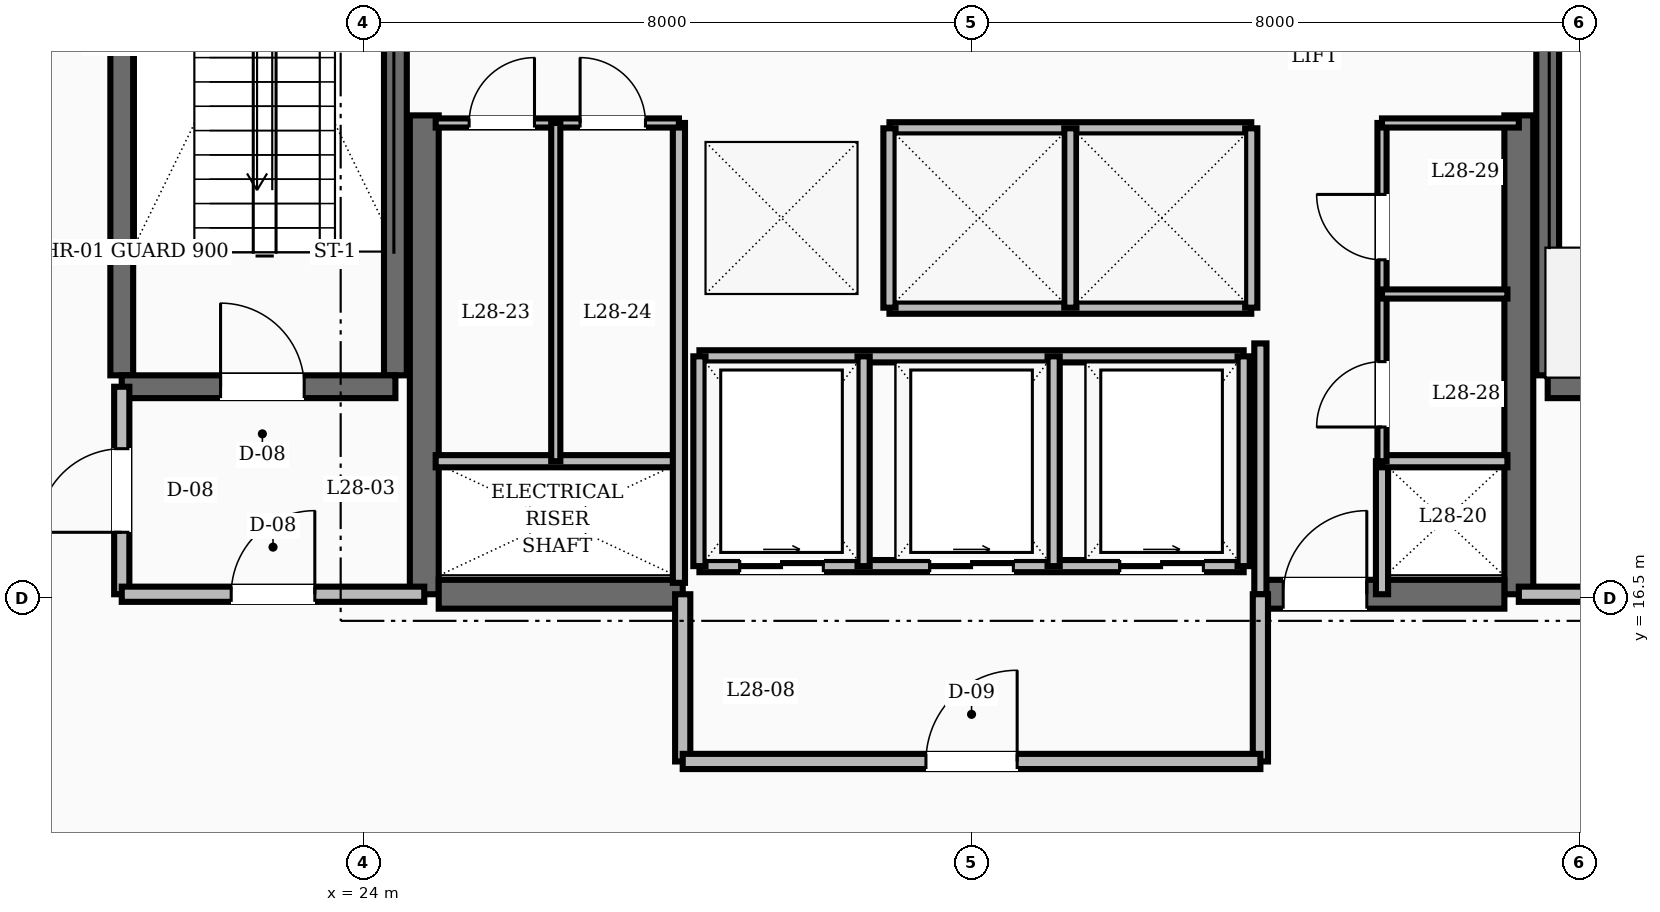
"""IFC4 building model, lengths in metres.
Left out: names, types, materials, properties, quantities, classifications, styles, units other than length and angle.
Written with IfcOpenShell. Run it as: python <this file> out.ifc"""

import sys

from ifc_helpers import new_model, si_unit, direction, frame, frame_2d, origin, place, context, subcontext, project, spatial, rectangle, extrude, element, fill, save


model = new_model("IFC4")
c1 = context("Model", 3, precision=1e-05, world=origin(), true_north=direction((0.0, 1.0)))
c2 = subcontext(c1, "Body", "Model", "MODEL_VIEW")
j1 = project(units=[si_unit("LENGTHUNIT", "METRE"), si_unit("PLANEANGLEUNIT", "RADIAN")], contexts=[c1])
p1 = place(None, origin())
s1 = spatial("IfcSite", under=j1, at=p1, CompositionType="ELEMENT")
p2 = place(p1, origin())
s2 = spatial("IfcBuilding", under=s1, at=p2, CompositionType="ELEMENT")
p3 = place(p2, frame((0.0, 0.0, 110.8)))
s3 = spatial("IfcBuildingStorey", under=s2, at=p3, CompositionType="ELEMENT", Elevation=110.8)
for number, where, z_axis, x_axis in (
    (1, (24.8, 16.55, 0.0), (0.0, 0.0, 1.0), (0.0, 1.0, 0.0)),
    (2, (39.2, 16.55, 0.0), (0.0, 0.0, 1.0), (0.0, 1.0, 0.0)),
):
    element("IfcWall", number, at=place(p3, frame(where, z_axis=z_axis, x_axis=x_axis)), inside=s3, PredefinedType="SHEAR", context=c2, shape_type="SweptSolid", body=[
        extrude(rectangle(XDim=6.3, YDim=0.38, at=frame_2d((3.15, 0.0))), origin(), (0.0, 0.0, 1.0), 6.4),
    ])
p4 = place(p3, frame((24.99, 16.55, 0.0), z_axis=(0.0, 0.0, 1.0), x_axis=(1.0, 0.0, 0.0)))
e3 = element("IfcWall", 3, at=p4, inside=s3, PredefinedType="SHEAR", context=c2, shape_type="SweptSolid", body=[
    extrude(rectangle(XDim=3.21, YDim=0.38, at=frame_2d((1.605, 0.0))), origin(), (0.0, 0.0, 1.0), 6.4),
])
p5 = place(p3, frame((35.8, 16.55, 0.0), z_axis=(0.0, 0.0, 1.0), x_axis=(1.0, 0.0, 0.0)))
e4 = element("IfcWall", 4, at=p5, inside=s3, PredefinedType="SHEAR", context=c2, shape_type="SweptSolid", body=[
    extrude(rectangle(XDim=3.21, YDim=0.38, at=frame_2d((1.605, 0.0))), origin(), (0.0, 0.0, 1.0), 6.4),
])
p6 = place(p5, frame((0.3, 0.0, 0.0)))
e5 = element("IfcOpeningElement", 5, at=p6, cuts=e4, PredefinedType="OPENING", context=c2, shape_type="SweptSolid", body=[
    extrude(rectangle(XDim=1.1, YDim=2.1, at=frame_2d((0.55, 1.05))), frame((0.0, 0.2, 0.0), z_axis=(0.0, -1.0, 0.0), x_axis=(1.0, 0.0, 0.0)), (0.0, 0.0, 1.0), 0.4),
])
for number, where, z_axis, x_axis in (
    (6, (20.82, 19.43, 0.0), (0.0, 0.0, 1.0), (0.0, 1.0, 0.0)),
    (7, (24.42, 19.43, 0.0), (0.0, 0.0, 1.0), (0.0, 1.0, 0.0)),
):
    element("IfcWall", number, at=place(p3, frame(where, z_axis=z_axis, x_axis=x_axis)), inside=s3, PredefinedType="SHEAR", context=c2, shape_type="SweptSolid", body=[
        extrude(rectangle(XDim=8.74, YDim=0.3, at=frame_2d((4.37, 0.0))), origin(), (0.0, 0.0, 1.0), 6.4),
    ])
p7 = place(p3, frame((20.82, 19.28, 0.0), z_axis=(0.0, 0.0, 1.0), x_axis=(1.0, 0.0, 0.0)))
e8 = element("IfcWall", 8, at=p7, inside=s3, PredefinedType="SHEAR", context=c2, shape_type="SweptSolid", body=[
    extrude(rectangle(XDim=3.6, YDim=0.3, at=frame_2d((1.8, 0.0))), origin(), (0.0, 0.0, 1.0), 6.4),
])
p8 = place(p7, frame((1.3, 0.0, 0.0)))
e9 = element("IfcOpeningElement", 9, at=p8, cuts=e8, PredefinedType="OPENING", context=c2, shape_type="SweptSolid", body=[
    extrude(rectangle(XDim=1.1, YDim=2.1, at=frame_2d((0.55, 1.05))), frame((0.0, 0.16, 0.0), z_axis=(0.0, -1.0, 0.0), x_axis=(1.0, 0.0, 0.0)), (0.0, 0.0, 1.0), 0.32),
])
p9 = place(p3, frame((39.58, 19.43, 0.0), z_axis=(0.0, 0.0, 1.0), x_axis=(0.0, 1.0, 0.0)))
e10 = element("IfcWall", 10, at=p9, inside=s3, PredefinedType="SHEAR", context=c2, shape_type="SweptSolid", body=[
    extrude(rectangle(XDim=8.74, YDim=0.3, at=frame_2d((4.37, 0.0))), origin(), (0.0, 0.0, 1.0), 6.4),
])
p10 = place(p3, frame((39.58, 19.28, 0.0), z_axis=(0.0, 0.0, 1.0), x_axis=(1.0, 0.0, 0.0)))
e11 = element("IfcWall", 11, at=p10, inside=s3, PredefinedType="SHEAR", context=c2, shape_type="SweptSolid", body=[
    extrude(rectangle(XDim=3.6, YDim=0.3, at=frame_2d((1.8, 0.0))), origin(), (0.0, 0.0, 1.0), 6.4),
])
p11 = place(p3, frame((20.82, 16.55, 0.0), z_axis=(0.0, 0.0, 1.0), x_axis=(0.0, 1.0, 0.0)))
e12 = element("IfcWall", 12, at=p11, inside=s3, PredefinedType="SOLIDWALL", context=c2, shape_type="SweptSolid", body=[
    extrude(rectangle(XDim=2.73, YDim=0.2, at=frame_2d((1.365, 0.0))), origin(), (0.0, 0.0, 1.0), 5.12),
])
p12 = place(p11, frame((0.815, 0.0, 0.0)))
e13 = element("IfcOpeningElement", 13, at=p12, cuts=e12, PredefinedType="OPENING", context=c2, shape_type="SweptSolid", body=[
    extrude(rectangle(XDim=1.1, YDim=2.1, at=frame_2d((0.55, 1.05))), frame((0.0, 0.11, 0.0), z_axis=(0.0, -1.0, 0.0), x_axis=(1.0, 0.0, 0.0)), (0.0, 0.0, 1.0), 0.22),
])
p13 = place(p3, frame((20.82, 16.55, 0.0), z_axis=(0.0, 0.0, 1.0), x_axis=(1.0, 0.0, 0.0)))
e14 = element("IfcWall", 14, at=p13, inside=s3, PredefinedType="SOLIDWALL", context=c2, shape_type="SweptSolid", body=[
    extrude(rectangle(XDim=3.98, YDim=0.2, at=frame_2d((1.99, 0.0))), origin(), (0.0, 0.0, 1.0), 5.12),
])
p14 = place(p13, frame((1.44, 0.0, 0.0)))
e15 = element("IfcOpeningElement", 15, at=p14, cuts=e14, PredefinedType="OPENING", context=c2, shape_type="SweptSolid", body=[
    extrude(rectangle(XDim=1.1, YDim=2.1, at=frame_2d((0.55, 1.05))), frame((0.0, 0.11, 0.0), z_axis=(0.0, -1.0, 0.0), x_axis=(1.0, 0.0, 0.0)), (0.0, 0.0, 1.0), 0.22),
])
p15 = place(p3, frame((39.2, 16.55, 0.0), z_axis=(0.0, 0.0, 1.0), x_axis=(1.0, 0.0, 0.0)))
e16 = element("IfcWall", 16, at=p15, inside=s3, PredefinedType="SOLIDWALL", context=c2, shape_type="SweptSolid", body=[
    extrude(rectangle(XDim=3.98, YDim=0.2, at=frame_2d((1.99, 0.0))), origin(), (0.0, 0.0, 1.0), 5.12),
])
p16 = place(p15, frame((1.515, 0.0, 0.0)))
e17 = element("IfcOpeningElement", 17, at=p16, cuts=e16, PredefinedType="OPENING", context=c2, shape_type="SweptSolid", body=[
    extrude(rectangle(XDim=0.95, YDim=2.1, at=frame_2d((0.475, 1.05))), frame((0.0, 0.11, 0.0), z_axis=(0.0, -1.0, 0.0), x_axis=(1.0, 0.0, 0.0)), (0.0, 0.0, 1.0), 0.22),
])
p17 = place(p3, frame((35.8, 16.55, 0.0), z_axis=(0.0, 0.0, 1.0), x_axis=(0.0, 1.0, 0.0)))
e18 = element("IfcWall", 18, at=p17, inside=s3, PredefinedType="SOLIDWALL", context=c2, shape_type="SweptSolid", body=[
    extrude(rectangle(XDim=3.3, YDim=0.16, at=frame_2d((1.65, 0.0))), origin(), (0.0, 0.0, 1.0), 5.12),
])
p18 = place(p3, frame((37.4, 16.55, 0.0), z_axis=(0.0, 0.0, 1.0), x_axis=(0.0, 1.0, 0.0)))
e19 = element("IfcWall", 19, at=p18, inside=s3, PredefinedType="SOLIDWALL", context=c2, shape_type="SweptSolid", body=[
    extrude(rectangle(XDim=1.75, YDim=0.16, at=frame_2d((0.875, 0.0))), origin(), (0.0, 0.0, 1.0), 5.12),
])
for number, where, z_axis, x_axis in (
    (20, (28.2, 14.35, 0.0), (0.0, 0.0, 1.0), (0.0, 1.0, 0.0)),
    (21, (35.8, 14.35, 0.0), (0.0, 0.0, 1.0), (0.0, 1.0, 0.0)),
):
    element("IfcWall", number, at=place(p3, frame(where, z_axis=z_axis, x_axis=x_axis)), inside=s3, PredefinedType="SOLIDWALL", context=c2, shape_type="SweptSolid", body=[
        extrude(rectangle(XDim=2.2, YDim=0.2, at=frame_2d((1.1, 0.0))), origin(), (0.0, 0.0, 1.0), 5.12),
    ])
p19 = place(p3, frame((28.2, 14.35, 0.0), z_axis=(0.0, 0.0, 1.0), x_axis=(1.0, 0.0, 0.0)))
e22 = element("IfcWall", 22, at=p19, inside=s3, PredefinedType="SOLIDWALL", context=c2, shape_type="SweptSolid", body=[
    extrude(rectangle(XDim=7.6, YDim=0.2, at=frame_2d((3.8, 0.0))), origin(), (0.0, 0.0, 1.0), 5.12),
])
p20 = place(p19, frame((3.2, 0.0, 0.0)))
e23 = element("IfcOpeningElement", 23, at=p20, cuts=e22, PredefinedType="OPENING", context=c2, shape_type="SweptSolid", body=[
    extrude(rectangle(XDim=1.2, YDim=2.1, at=frame_2d((0.6, 1.05))), frame((0.0, 0.11, 0.0), z_axis=(0.0, -1.0, 0.0), x_axis=(1.0, 0.0, 0.0)), (0.0, 0.0, 1.0), 0.22),
])
for number, where, z_axis, x_axis in (
    (24, (30.92, 22.68, 0.0), (0.0, 0.0, 1.0), (1.0, 0.0, 0.0)),
    (25, (30.92, 20.32, 0.0), (0.0, 0.0, 1.0), (1.0, 0.0, 0.0)),
):
    element("IfcWall", number, at=place(p3, frame(where, z_axis=z_axis, x_axis=x_axis)), inside=s3, PredefinedType="SOLIDWALL", context=c2, shape_type="SweptSolid", body=[
        extrude(rectangle(XDim=4.76, YDim=0.16, at=frame_2d((2.38, 0.0))), origin(), (0.0, 0.0, 1.0), 5.12),
    ])
for number, where, z_axis, x_axis in (
    (26, (30.92, 20.32, 0.0), (0.0, 0.0, 1.0), (0.0, 1.0, 0.0)),
    (27, (33.3, 20.32, 0.0), (0.0, 0.0, 1.0), (0.0, 1.0, 0.0)),
    (28, (35.68, 20.32, 0.0), (0.0, 0.0, 1.0), (0.0, 1.0, 0.0)),
):
    element("IfcWall", number, at=place(p3, frame(where, z_axis=z_axis, x_axis=x_axis)), inside=s3, PredefinedType="SOLIDWALL", context=c2, shape_type="SweptSolid", body=[
        extrude(rectangle(XDim=2.36, YDim=0.16, at=frame_2d((1.18, 0.0))), origin(), (0.0, 0.0, 1.0), 5.12),
    ])
p21 = place(p3, frame((28.42, 16.92, 0.0), z_axis=(0.0, 0.0, 1.0), x_axis=(1.0, 0.0, 0.0)))
e29 = element("IfcWall", 29, at=p21, inside=s3, PredefinedType="SOLIDWALL", context=c2, shape_type="SweptSolid", body=[
    extrude(rectangle(XDim=7.16, YDim=0.16, at=frame_2d((3.58, 0.0))), origin(), (0.0, 0.0, 1.0), 5.12),
])
p22 = place(p21, frame((0.53, 0.0, 0.0)))
e30 = element("IfcOpeningElement", 30, at=p22, cuts=e29, PredefinedType="OPENING", context=c2, shape_type="SweptSolid", body=[
    extrude(rectangle(XDim=1.1, YDim=2.15, at=frame_2d((0.55, 1.075))), frame((0.0, 0.09, 0.0), z_axis=(0.0, -1.0, 0.0), x_axis=(1.0, 0.0, 0.0)), (0.0, 0.0, 1.0), 0.18),
])
p23 = place(p21, frame((3.03, 0.0, 0.0)))
e31 = element("IfcOpeningElement", 31, at=p23, cuts=e29, PredefinedType="OPENING", context=c2, shape_type="SweptSolid", body=[
    extrude(rectangle(XDim=1.1, YDim=2.15, at=frame_2d((0.55, 1.075))), frame((0.0, 0.09, 0.0), z_axis=(0.0, -1.0, 0.0), x_axis=(1.0, 0.0, 0.0)), (0.0, 0.0, 1.0), 0.18),
])
p24 = place(p21, frame((5.53, 0.0, 0.0)))
e32 = element("IfcOpeningElement", 32, at=p24, cuts=e29, PredefinedType="OPENING", context=c2, shape_type="SweptSolid", body=[
    extrude(rectangle(XDim=1.1, YDim=2.15, at=frame_2d((0.55, 1.075))), frame((0.0, 0.09, 0.0), z_axis=(0.0, -1.0, 0.0), x_axis=(1.0, 0.0, 0.0)), (0.0, 0.0, 1.0), 0.18),
])
p25 = place(p3, frame((28.42, 19.68, 0.0), z_axis=(0.0, 0.0, 1.0), x_axis=(1.0, 0.0, 0.0)))
e33 = element("IfcWall", 33, at=p25, inside=s3, PredefinedType="SOLIDWALL", context=c2, shape_type="SweptSolid", body=[
    extrude(rectangle(XDim=7.16, YDim=0.16, at=frame_2d((3.58, 0.0))), origin(), (0.0, 0.0, 1.0), 5.12),
])
for number, where, z_axis, x_axis in (
    (34, (28.42, 16.92, 0.0), (0.0, 0.0, 1.0), (0.0, 1.0, 0.0)),
    (35, (30.58, 16.92, 0.0), (0.0, 0.0, 1.0), (0.0, 1.0, 0.0)),
    (36, (33.08, 16.92, 0.0), (0.0, 0.0, 1.0), (0.0, 1.0, 0.0)),
    (37, (35.58, 16.92, 0.0), (0.0, 0.0, 1.0), (0.0, 1.0, 0.0)),
):
    element("IfcWall", number, at=place(p3, frame(where, z_axis=z_axis, x_axis=x_axis)), inside=s3, PredefinedType="SOLIDWALL", context=c2, shape_type="SweptSolid", body=[
        extrude(rectangle(XDim=2.76, YDim=0.16, at=frame_2d((1.38, 0.0))), origin(), (0.0, 0.0, 1.0), 5.12),
    ])
p26 = place(p3, frame((24.95, 18.3, 0.0), z_axis=(0.0, 0.0, 1.0), x_axis=(1.0, 0.0, 0.0)))
e38 = element("IfcWall", 38, at=p26, inside=s3, PredefinedType="SOLIDWALL", context=c2, shape_type="SweptSolid", body=[
    extrude(rectangle(XDim=3.2, YDim=0.16, at=frame_2d((1.6, 0.0))), origin(), (0.0, 0.0, 1.0), 5.12),
])
p27 = place(p3, frame((28.15, 16.7, 0.0), z_axis=(0.0, 0.0, 1.0), x_axis=(0.0, 1.0, 0.0)))
e39 = element("IfcWall", 39, at=p27, inside=s3, PredefinedType="SOLIDWALL", context=c2, shape_type="SweptSolid", body=[
    extrude(rectangle(XDim=6.05, YDim=0.16, at=frame_2d((3.025, 0.0))), origin(), (0.0, 0.0, 1.0), 5.12),
])
p28 = place(p3, frame((37.4, 18.3, 0.0), z_axis=(0.0, 0.0, 1.0), x_axis=(1.0, 0.0, 0.0)))
e40 = element("IfcWall", 40, at=p28, inside=s3, PredefinedType="SOLIDWALL", context=c2, shape_type="SweptSolid", body=[
    extrude(rectangle(XDim=1.65, YDim=0.16, at=frame_2d((0.825, 0.0))), origin(), (0.0, 0.0, 1.0), 5.12),
])
p29 = place(p3, frame((24.95, 22.75, 0.0), z_axis=(0.0, 0.0, 1.0), x_axis=(1.0, 0.0, 0.0)))
e41 = element("IfcWall", 41, at=p29, inside=s3, PredefinedType="PARTITIONING", context=c2, shape_type="SweptSolid", body=[
    extrude(rectangle(XDim=3.2, YDim=0.12, at=frame_2d((1.6, 0.0))), origin(), (0.0, 0.0, 1.0), 5.12),
])
p30 = place(p29, frame((0.44, 0.0, 0.0)))
e42 = element("IfcOpeningElement", 42, at=p30, cuts=e41, PredefinedType="OPENING", context=c2, shape_type="SweptSolid", body=[
    extrude(rectangle(XDim=0.86, YDim=2.1, at=frame_2d((0.43, 1.05))), frame((0.0, 0.07, 0.0), z_axis=(0.0, -1.0, 0.0), x_axis=(1.0, 0.0, 0.0)), (0.0, 0.0, 1.0), 0.14),
])
p31 = place(p29, frame((1.9, 0.0, 0.0)))
e43 = element("IfcOpeningElement", 43, at=p31, cuts=e41, PredefinedType="OPENING", context=c2, shape_type="SweptSolid", body=[
    extrude(rectangle(XDim=0.86, YDim=2.1, at=frame_2d((0.43, 1.05))), frame((0.0, 0.07, 0.0), z_axis=(0.0, -1.0, 0.0), x_axis=(1.0, 0.0, 0.0)), (0.0, 0.0, 1.0), 0.14),
])
p32 = place(p3, frame((37.4, 18.3, 0.0), z_axis=(0.0, 0.0, 1.0), x_axis=(0.0, 1.0, 0.0)))
e44 = element("IfcWall", 44, at=p32, inside=s3, PredefinedType="PARTITIONING", context=c2, shape_type="SweptSolid", body=[
    extrude(rectangle(XDim=4.45, YDim=0.12, at=frame_2d((2.225, 0.0))), origin(), (0.0, 0.0, 1.0), 5.12),
])
p33 = place(p32, frame((0.45, 0.0, 0.0)))
e45 = element("IfcOpeningElement", 45, at=p33, cuts=e44, PredefinedType="OPENING", context=c2, shape_type="SweptSolid", body=[
    extrude(rectangle(XDim=0.86, YDim=2.1, at=frame_2d((0.43, 1.05))), frame((0.0, 0.07, 0.0), z_axis=(0.0, -1.0, 0.0), x_axis=(1.0, 0.0, 0.0)), (0.0, 0.0, 1.0), 0.14),
])
p34 = place(p32, frame((2.65, 0.0, 0.0)))
e46 = element("IfcOpeningElement", 46, at=p34, cuts=e44, PredefinedType="OPENING", context=c2, shape_type="SweptSolid", body=[
    extrude(rectangle(XDim=0.86, YDim=2.1, at=frame_2d((0.43, 1.05))), frame((0.0, 0.07, 0.0), z_axis=(0.0, -1.0, 0.0), x_axis=(1.0, 0.0, 0.0)), (0.0, 0.0, 1.0), 0.14),
])
p35 = place(p3, frame((37.4, 22.75, 0.0), z_axis=(0.0, 0.0, 1.0), x_axis=(1.0, 0.0, 0.0)))
e47 = element("IfcWall", 47, at=p35, inside=s3, PredefinedType="PARTITIONING", context=c2, shape_type="SweptSolid", body=[
    extrude(rectangle(XDim=1.8, YDim=0.12, at=frame_2d((0.9, 0.0))), origin(), (0.0, 0.0, 1.0), 5.12),
])
p36 = place(p3, frame((26.53, 18.3, 0.0), z_axis=(0.0, 0.0, 1.0), x_axis=(0.0, 1.0, 0.0)))
e48 = element("IfcWall", 48, at=p36, inside=s3, PredefinedType="PARTITIONING", context=c2, shape_type="SweptSolid", body=[
    extrude(rectangle(XDim=4.45, YDim=0.12, at=frame_2d((2.225, 0.0))), origin(), (0.0, 0.0, 1.0), 5.12),
])
p37 = place(p3, frame((37.4, 20.5, 0.0), z_axis=(0.0, 0.0, 1.0), x_axis=(1.0, 0.0, 0.0)))
e49 = element("IfcWall", 49, at=p37, inside=s3, PredefinedType="PARTITIONING", context=c2, shape_type="SweptSolid", body=[
    extrude(rectangle(XDim=1.65, YDim=0.12, at=frame_2d((0.825, 0.0))), origin(), (0.0, 0.0, 1.0), 5.12),
])
p38 = place(p3, frame((17.65, 14.412, 0.0), z_axis=(0.0, 0.0, 1.0), x_axis=(0.841548863049, -0.540180998464, 0.0)))
e50 = element("IfcWall", 50, at=p38, inside=s3, PredefinedType="SOLIDWALL", context=c2, shape_type="SweptSolid", body=[
    extrude(rectangle(XDim=3.446, YDim=0.2, at=frame_2d((1.723, 0.0))), origin(), (0.0, 0.0, 1.0), 5.12),
])
p39 = place(p8, origin())
e51 = element("IfcDoor", 51, at=p39, inside=s3, OperationType="SINGLE_SWING_LEFT", PredefinedType="DOOR", context=c2, shape_type="SweptSolid", body=[
    extrude(rectangle(XDim=1.1, YDim=2.1, at=frame_2d((0.55, 1.05))), frame((0.0, 0.025, 0.0), z_axis=(0.0, -1.0, 0.0), x_axis=(1.0, 0.0, 0.0)), (0.0, 0.0, 1.0), 0.05),
])
fill(e9, e51)
p40 = place(p12, origin())
e52 = element("IfcDoor", 52, at=p40, inside=s3, OperationType="SINGLE_SWING_LEFT", PredefinedType="DOOR", context=c2, shape_type="SweptSolid", body=[
    extrude(rectangle(XDim=1.1, YDim=2.1, at=frame_2d((0.55, 1.05))), frame((0.0, 0.025, 0.0), z_axis=(0.0, -1.0, 0.0), x_axis=(1.0, 0.0, 0.0)), (0.0, 0.0, 1.0), 0.05),
])
fill(e13, e52)
p41 = place(p14, origin())
e53 = element("IfcDoor", 53, at=p41, inside=s3, OperationType="SINGLE_SWING_RIGHT", PredefinedType="DOOR", context=c2, shape_type="SweptSolid", body=[
    extrude(rectangle(XDim=1.1, YDim=2.1, at=frame_2d((0.55, 1.05))), frame((0.0, 0.025, 0.0), z_axis=(0.0, -1.0, 0.0), x_axis=(1.0, 0.0, 0.0)), (0.0, 0.0, 1.0), 0.05),
])
fill(e15, e53)
p42 = place(p6, origin())
e54 = element("IfcDoor", 54, at=p42, inside=s3, OperationType="SINGLE_SWING_RIGHT", PredefinedType="DOOR", context=c2, shape_type="SweptSolid", body=[
    extrude(rectangle(XDim=1.1, YDim=2.1, at=frame_2d((0.55, 1.05))), frame((0.0, 0.025, 0.0), z_axis=(0.0, -1.0, 0.0), x_axis=(1.0, 0.0, 0.0)), (0.0, 0.0, 1.0), 0.05),
])
fill(e5, e54)
p43 = place(p20, origin())
e55 = element("IfcDoor", 55, at=p43, inside=s3, OperationType="SINGLE_SWING_RIGHT", PredefinedType="DOOR", context=c2, shape_type="SweptSolid", body=[
    extrude(rectangle(XDim=1.2, YDim=2.1, at=frame_2d((0.6, 1.05))), frame((0.0, 0.025, 0.0), z_axis=(0.0, -1.0, 0.0), x_axis=(1.0, 0.0, 0.0)), (0.0, 0.0, 1.0), 0.05),
])
fill(e23, e55)
p44 = place(p22, origin())
e56 = element("IfcDoor", 56, at=p44, inside=s3, OperationType="SLIDING_TO_RIGHT", PredefinedType="DOOR", context=c2, shape_type="SweptSolid", body=[
    extrude(rectangle(XDim=1.1, YDim=2.15, at=frame_2d((0.55, 1.075))), frame((0.0, 0.025, 0.0), z_axis=(0.0, -1.0, 0.0), x_axis=(1.0, 0.0, 0.0)), (0.0, 0.0, 1.0), 0.05),
])
fill(e30, e56)
p45 = place(p23, origin())
e57 = element("IfcDoor", 57, at=p45, inside=s3, OperationType="SLIDING_TO_RIGHT", PredefinedType="DOOR", context=c2, shape_type="SweptSolid", body=[
    extrude(rectangle(XDim=1.1, YDim=2.15, at=frame_2d((0.55, 1.075))), frame((0.0, 0.025, 0.0), z_axis=(0.0, -1.0, 0.0), x_axis=(1.0, 0.0, 0.0)), (0.0, 0.0, 1.0), 0.05),
])
fill(e31, e57)
p46 = place(p24, origin())
e58 = element("IfcDoor", 58, at=p46, inside=s3, OperationType="SLIDING_TO_RIGHT", PredefinedType="DOOR", context=c2, shape_type="SweptSolid", body=[
    extrude(rectangle(XDim=1.1, YDim=2.15, at=frame_2d((0.55, 1.075))), frame((0.0, 0.025, 0.0), z_axis=(0.0, -1.0, 0.0), x_axis=(1.0, 0.0, 0.0)), (0.0, 0.0, 1.0), 0.05),
])
fill(e32, e58)
p47 = place(p30, origin())
e59 = element("IfcDoor", 59, at=p47, inside=s3, OperationType="SINGLE_SWING_RIGHT", PredefinedType="DOOR", context=c2, shape_type="SweptSolid", body=[
    extrude(rectangle(XDim=0.86, YDim=2.1, at=frame_2d((0.43, 1.05))), frame((0.0, 0.025, 0.0), z_axis=(0.0, -1.0, 0.0), x_axis=(1.0, 0.0, 0.0)), (0.0, 0.0, 1.0), 0.05),
])
fill(e42, e59)
p48 = place(p31, origin())
e60 = element("IfcDoor", 60, at=p48, inside=s3, OperationType="SINGLE_SWING_LEFT", PredefinedType="DOOR", context=c2, shape_type="SweptSolid", body=[
    extrude(rectangle(XDim=0.86, YDim=2.1, at=frame_2d((0.43, 1.05))), frame((0.0, 0.025, 0.0), z_axis=(0.0, -1.0, 0.0), x_axis=(1.0, 0.0, 0.0)), (0.0, 0.0, 1.0), 0.05),
])
fill(e43, e60)
p49 = place(p33, origin())
e61 = element("IfcDoor", 61, at=p49, inside=s3, OperationType="SINGLE_SWING_LEFT", PredefinedType="DOOR", context=c2, shape_type="SweptSolid", body=[
    extrude(rectangle(XDim=0.86, YDim=2.1, at=frame_2d((0.43, 1.05))), frame((0.0, 0.025, 0.0), z_axis=(0.0, -1.0, 0.0), x_axis=(1.0, 0.0, 0.0)), (0.0, 0.0, 1.0), 0.05),
])
fill(e45, e61)
p50 = place(p34, origin())
e62 = element("IfcDoor", 62, at=p50, inside=s3, OperationType="SINGLE_SWING_RIGHT", PredefinedType="DOOR", context=c2, shape_type="SweptSolid", body=[
    extrude(rectangle(XDim=0.86, YDim=2.1, at=frame_2d((0.43, 1.05))), frame((0.0, 0.025, 0.0), z_axis=(0.0, -1.0, 0.0), x_axis=(1.0, 0.0, 0.0)), (0.0, 0.0, 1.0), 0.05),
])
fill(e46, e62)
save(model, sys.argv[1])
